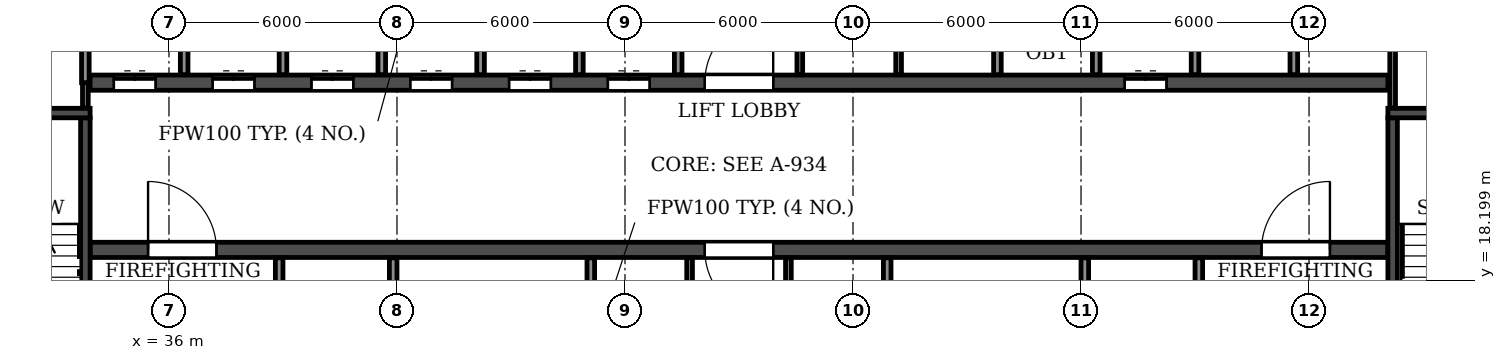
"""IFC4 building model, lengths in metres.
Left out: names, types, materials, properties, quantities, classifications, styles, units other than length and angle.
Written with IfcOpenShell. Run it as: python <this file> out.ifc"""

import sys

from ifc_helpers import new_model, si_unit, direction, frame, frame_2d, origin, place, context, subcontext, project, spatial, rectangle, extrude, element, fill, save


model = new_model("IFC4")
c1 = context("Model", 3, precision=1e-05, world=origin(), true_north=direction((0.0, 1.0)))
c2 = subcontext(c1, "Body", "Model", "MODEL_VIEW")
j1 = project(units=[si_unit("LENGTHUNIT", "METRE"), si_unit("PLANEANGLEUNIT", "RADIAN")], contexts=[c1])
p1 = place(None, origin())
s1 = spatial("IfcSite", under=j1, at=p1, CompositionType="ELEMENT")
p2 = place(p1, origin())
s2 = spatial("IfcBuilding", under=s1, at=p2, CompositionType="ELEMENT")
p3 = place(p2, frame((0.0, 0.0, 191.7)))
s3 = spatial("IfcBuildingStorey", under=s2, at=p3, CompositionType="ELEMENT", Elevation=191.7)
p4 = place(p3, frame((33.925, 19.0, 0.0), z_axis=(0.0, 0.0, 1.0), x_axis=(1.0, 0.0, 0.0)))
e1 = element("IfcWall", 1, at=p4, inside=s3, PredefinedType="SOLIDWALL", context=c2, shape_type="SweptSolid", body=[
    extrude(rectangle(XDim=34.15, YDim=0.4, at=frame_2d((17.075, 0.0))), origin(), (0.0, 0.0, 1.0), 3.08),
])
p5 = place(p4, frame((16.175, 0.0, 0.0)))
e2 = element("IfcOpeningElement", 2, at=p5, cuts=e1, PredefinedType="OPENING", context=c2, shape_type="SweptSolid", body=[
    extrude(rectangle(XDim=1.8, YDim=2.1, at=frame_2d((0.9, 1.05))), frame((0.0, 0.21, 0.0), z_axis=(0.0, -1.0, 0.0), x_axis=(1.0, 0.0, 0.0)), (0.0, 0.0, 1.0), 0.42),
])
p6 = place(p4, frame((1.525, 0.0, 0.0)))
e3 = element("IfcOpeningElement", 3, at=p6, cuts=e1, PredefinedType="OPENING", context=c2, shape_type="SweptSolid", body=[
    extrude(rectangle(XDim=1.8, YDim=2.1, at=frame_2d((0.9, 1.05))), frame((0.0, 0.21, 0.0), z_axis=(0.0, -1.0, 0.0), x_axis=(1.0, 0.0, 0.0)), (0.0, 0.0, 1.0), 0.42),
])
p7 = place(p4, frame((30.825, 0.0, 0.0)))
e4 = element("IfcOpeningElement", 4, at=p7, cuts=e1, PredefinedType="OPENING", context=c2, shape_type="SweptSolid", body=[
    extrude(rectangle(XDim=1.8, YDim=2.1, at=frame_2d((0.9, 1.05))), frame((0.0, 0.21, 0.0), z_axis=(0.0, -1.0, 0.0), x_axis=(1.0, 0.0, 0.0)), (0.0, 0.0, 1.0), 0.42),
])
p8 = place(p3, frame((33.925, 23.4, 0.0), z_axis=(0.0, 0.0, 1.0), x_axis=(1.0, 0.0, 0.0)))
e5 = element("IfcWall", 5, at=p8, inside=s3, PredefinedType="SOLIDWALL", context=c2, shape_type="SweptSolid", body=[
    extrude(rectangle(XDim=34.15, YDim=0.4, at=frame_2d((17.075, 0.0))), origin(), (0.0, 0.0, 1.0), 3.08),
])
p9 = place(p8, frame((16.175, 0.0, 0.0)))
e6 = element("IfcOpeningElement", 6, at=p9, cuts=e5, PredefinedType="OPENING", context=c2, shape_type="SweptSolid", body=[
    extrude(rectangle(XDim=1.8, YDim=2.1, at=frame_2d((0.9, 1.05))), frame((0.0, 0.21, 0.0), z_axis=(0.0, -1.0, 0.0), x_axis=(1.0, 0.0, 0.0)), (0.0, 0.0, 1.0), 0.42),
])
p10 = place(p8, frame((0.625, 0.0, 0.0)))
e7 = element("IfcOpeningElement", 7, at=p10, cuts=e5, PredefinedType="OPENING", context=c2, shape_type="SweptSolid", body=[
    extrude(rectangle(XDim=1.1, YDim=2.1, at=frame_2d((0.55, 1.05))), frame((0.0, 0.21, 0.0), z_axis=(0.0, -1.0, 0.0), x_axis=(1.0, 0.0, 0.0)), (0.0, 0.0, 1.0), 0.42),
])
p11 = place(p8, frame((3.225, 0.0, 0.0)))
e8 = element("IfcOpeningElement", 8, at=p11, cuts=e5, PredefinedType="OPENING", context=c2, shape_type="SweptSolid", body=[
    extrude(rectangle(XDim=1.1, YDim=2.1, at=frame_2d((0.55, 1.05))), frame((0.0, 0.21, 0.0), z_axis=(0.0, -1.0, 0.0), x_axis=(1.0, 0.0, 0.0)), (0.0, 0.0, 1.0), 0.42),
])
p12 = place(p8, frame((5.825, 0.0, 0.0)))
e9 = element("IfcOpeningElement", 9, at=p12, cuts=e5, PredefinedType="OPENING", context=c2, shape_type="SweptSolid", body=[
    extrude(rectangle(XDim=1.1, YDim=2.1, at=frame_2d((0.55, 1.05))), frame((0.0, 0.21, 0.0), z_axis=(0.0, -1.0, 0.0), x_axis=(1.0, 0.0, 0.0)), (0.0, 0.0, 1.0), 0.42),
])
p13 = place(p8, frame((8.425, 0.0, 0.0)))
e10 = element("IfcOpeningElement", 10, at=p13, cuts=e5, PredefinedType="OPENING", context=c2, shape_type="SweptSolid", body=[
    extrude(rectangle(XDim=1.1, YDim=2.1, at=frame_2d((0.55, 1.05))), frame((0.0, 0.21, 0.0), z_axis=(0.0, -1.0, 0.0), x_axis=(1.0, 0.0, 0.0)), (0.0, 0.0, 1.0), 0.42),
])
p14 = place(p8, frame((11.025, 0.0, 0.0)))
e11 = element("IfcOpeningElement", 11, at=p14, cuts=e5, PredefinedType="OPENING", context=c2, shape_type="SweptSolid", body=[
    extrude(rectangle(XDim=1.1, YDim=2.1, at=frame_2d((0.55, 1.05))), frame((0.0, 0.21, 0.0), z_axis=(0.0, -1.0, 0.0), x_axis=(1.0, 0.0, 0.0)), (0.0, 0.0, 1.0), 0.42),
])
p15 = place(p8, frame((13.625, 0.0, 0.0)))
e12 = element("IfcOpeningElement", 12, at=p15, cuts=e5, PredefinedType="OPENING", context=c2, shape_type="SweptSolid", body=[
    extrude(rectangle(XDim=1.1, YDim=2.1, at=frame_2d((0.55, 1.05))), frame((0.0, 0.21, 0.0), z_axis=(0.0, -1.0, 0.0), x_axis=(1.0, 0.0, 0.0)), (0.0, 0.0, 1.0), 0.42),
])
p16 = place(p8, frame((27.225, 0.0, 0.0)))
e13 = element("IfcOpeningElement", 13, at=p16, cuts=e5, PredefinedType="OPENING", context=c2, shape_type="SweptSolid", body=[
    extrude(rectangle(XDim=1.1, YDim=2.1, at=frame_2d((0.55, 1.05))), frame((0.0, 0.21, 0.0), z_axis=(0.0, -1.0, 0.0), x_axis=(1.0, 0.0, 0.0)), (0.0, 0.0, 1.0), 0.42),
])
p17 = place(p3, frame((33.8, 14.8, 0.0), z_axis=(0.0, 0.0, 1.0), x_axis=(0.0, 1.0, 0.0)))
e14 = element("IfcWall", 14, at=p17, inside=s3, PredefinedType="SOLIDWALL", context=c2, shape_type="SweptSolid", body=[
    extrude(rectangle(XDim=7.675, YDim=0.25, at=frame_2d((3.837, 0.0))), origin(), (0.0, 0.0, 1.0), 3.08),
])
p18 = place(p17, frame((0.5, 0.0, 0.0)))
e15 = element("IfcOpeningElement", 15, at=p18, cuts=e14, PredefinedType="OPENING", context=c2, shape_type="SweptSolid", body=[
    extrude(rectangle(XDim=1.0, YDim=2.1, at=frame_2d((0.5, 1.05))), frame((0.0, 0.135, 0.0), z_axis=(0.0, -1.0, 0.0), x_axis=(1.0, 0.0, 0.0)), (0.0, 0.0, 1.0), 0.27),
])
p19 = place(p3, frame((29.875, 22.6, 0.0), z_axis=(0.0, 0.0, 1.0), x_axis=(1.0, 0.0, 0.0)))
e16 = element("IfcWall", 16, at=p19, inside=s3, PredefinedType="SOLIDWALL", context=c2, shape_type="SweptSolid", body=[
    extrude(rectangle(XDim=4.05, YDim=0.25, at=frame_2d((2.025, 0.0))), origin(), (0.0, 0.0, 1.0), 3.08),
])
p20 = place(p3, frame((68.2, 14.8, 0.0), z_axis=(0.0, 0.0, 1.0), x_axis=(0.0, 1.0, 0.0)))
e17 = element("IfcWall", 17, at=p20, inside=s3, PredefinedType="SOLIDWALL", context=c2, shape_type="SweptSolid", body=[
    extrude(rectangle(XDim=7.675, YDim=0.25, at=frame_2d((3.837, 0.0))), origin(), (0.0, 0.0, 1.0), 3.08),
])
p21 = place(p20, frame((0.5, 0.0, 0.0)))
e18 = element("IfcOpeningElement", 18, at=p21, cuts=e17, PredefinedType="OPENING", context=c2, shape_type="SweptSolid", body=[
    extrude(rectangle(XDim=1.0, YDim=2.1, at=frame_2d((0.5, 1.05))), frame((0.0, 0.135, 0.0), z_axis=(0.0, -1.0, 0.0), x_axis=(1.0, 0.0, 0.0)), (0.0, 0.0, 1.0), 0.27),
])
p22 = place(p3, frame((68.075, 22.6, 0.0), z_axis=(0.0, 0.0, 1.0), x_axis=(1.0, 0.0, 0.0)))
e19 = element("IfcWall", 19, at=p22, inside=s3, PredefinedType="SOLIDWALL", context=c2, shape_type="SweptSolid", body=[
    extrude(rectangle(XDim=4.05, YDim=0.25, at=frame_2d((2.025, 0.0))), origin(), (0.0, 0.0, 1.0), 3.08),
])
for number, where, z_axis, x_axis in (
    (20, (49.7, 14.81, 0.0), (0.0, 0.0, 1.0), (0.0, 1.0, 0.0)),
    (21, (52.3, 14.81, 0.0), (0.0, 0.0, 1.0), (0.0, 1.0, 0.0)),
    (22, (52.6, 23.61, 0.0), (0.0, 0.0, 1.0), (0.0, 1.0, 0.0)),
    (23, (55.2, 23.61, 0.0), (0.0, 0.0, 1.0), (0.0, 1.0, 0.0)),
):
    element("IfcWall", number, at=place(p3, frame(where, z_axis=z_axis, x_axis=x_axis)), inside=s3, PredefinedType="PARTITIONING", context=c2, shape_type="SweptSolid", body=[
        extrude(rectangle(XDim=3.98, YDim=0.15, at=frame_2d((1.99, 0.0))), origin(), (0.0, 0.0, 1.0), 3.08),
    ])
for number, where, z_axis, x_axis in (
    (24, (47.1, 14.81, 0.0), (0.0, 0.0, 1.0), (0.0, 1.0, 0.0)),
    (25, (54.9, 14.81, 0.0), (0.0, 0.0, 1.0), (0.0, 1.0, 0.0)),
    (26, (65.6, 23.61, 0.0), (0.0, 0.0, 1.0), (0.0, 1.0, 0.0)),
):
    element("IfcWall", number, at=place(p3, frame(where, z_axis=z_axis, x_axis=x_axis)), inside=s3, PredefinedType="PARTITIONING", context=c2, shape_type="SweptSolid", body=[
        extrude(rectangle(XDim=3.98, YDim=0.2, at=frame_2d((1.99, 0.0))), origin(), (0.0, 0.0, 1.0), 3.08),
    ])
p23 = place(p3, frame((33.8, 22.735, 0.0), z_axis=(0.0, 0.0, 1.0), x_axis=(0.0, 1.0, 0.0)))
e27 = element("IfcWall", 27, at=p23, inside=s3, PredefinedType="PARTITIONING", context=c2, shape_type="SweptSolid", body=[
    extrude(rectangle(XDim=0.665, YDim=0.15, at=frame_2d((0.333, 0.0))), origin(), (0.0, 0.0, 1.0), 3.08),
])
p24 = place(p3, frame((68.2, 22.735, 0.0), z_axis=(0.0, 0.0, 1.0), x_axis=(0.0, 1.0, 0.0)))
e28 = element("IfcWall", 28, at=p24, inside=s3, PredefinedType="PARTITIONING", context=c2, shape_type="SweptSolid", body=[
    extrude(rectangle(XDim=4.855, YDim=0.15, at=frame_2d((2.427, 0.0))), origin(), (0.0, 0.0, 1.0), 3.08),
])
p25 = place(p3, frame((33.8, 23.4, 0.0), z_axis=(0.0, 0.0, 1.0), x_axis=(0.0, 1.0, 0.0)))
e29 = element("IfcWall", 29, at=p25, inside=s3, PredefinedType="PARTITIONING", context=c2, shape_type="SweptSolid", body=[
    extrude(rectangle(XDim=2.7, YDim=0.2, at=frame_2d((1.35, 0.0))), origin(), (0.0, 0.0, 1.0), 3.08),
])
p26 = place(p3, frame((36.4, 23.61, 0.0), z_axis=(0.0, 0.0, 1.0), x_axis=(0.0, 1.0, 0.0)))
e30 = element("IfcWall", 30, at=p26, inside=s3, PredefinedType="PARTITIONING", context=c2, shape_type="SweptSolid", body=[
    extrude(rectangle(XDim=2.49, YDim=0.2, at=frame_2d((1.245, 0.0))), origin(), (0.0, 0.0, 1.0), 3.08),
])
p27 = place(p3, frame((38.9, 14.81, 0.0), z_axis=(0.0, 0.0, 1.0), x_axis=(0.0, 1.0, 0.0)))
e31 = element("IfcWall", 31, at=p27, inside=s3, PredefinedType="PARTITIONING", context=c2, shape_type="SweptSolid", body=[
    extrude(rectangle(XDim=3.98, YDim=0.2, at=frame_2d((1.99, 0.0))), origin(), (0.0, 0.0, 1.0), 3.08),
])
p28 = place(p27, frame((1.44, 0.0, 0.0)))
e32 = element("IfcOpeningElement", 32, at=p28, cuts=e31, PredefinedType="OPENING", context=c2, shape_type="SweptSolid", body=[
    extrude(rectangle(XDim=1.1, YDim=2.1, at=frame_2d((0.55, 1.05))), frame((0.0, 0.11, 0.0), z_axis=(0.0, -1.0, 0.0), x_axis=(1.0, 0.0, 0.0)), (0.0, 0.0, 1.0), 0.22),
])
for number, where, z_axis, x_axis in (
    (33, (39.0, 23.61, 0.0), (0.0, 0.0, 1.0), (0.0, 1.0, 0.0)),
    (34, (41.6, 23.61, 0.0), (0.0, 0.0, 1.0), (0.0, 1.0, 0.0)),
):
    element("IfcWall", number, at=place(p3, frame(where, z_axis=z_axis, x_axis=x_axis)), inside=s3, PredefinedType="PARTITIONING", context=c2, shape_type="SweptSolid", body=[
        extrude(rectangle(XDim=2.49, YDim=0.2, at=frame_2d((1.245, 0.0))), origin(), (0.0, 0.0, 1.0), 3.08),
    ])
for number, where, z_axis, x_axis in (
    (35, (41.9, 14.81, 0.0), (0.0, 0.0, 1.0), (0.0, 1.0, 0.0)),
    (36, (44.2, 23.61, 0.0), (0.0, 0.0, 1.0), (0.0, 1.0, 0.0)),
    (37, (46.8, 23.61, 0.0), (0.0, 0.0, 1.0), (0.0, 1.0, 0.0)),
):
    element("IfcWall", number, at=place(p3, frame(where, z_axis=z_axis, x_axis=x_axis)), inside=s3, PredefinedType="PARTITIONING", context=c2, shape_type="SweptSolid", body=[
        extrude(rectangle(XDim=3.98, YDim=0.2, at=frame_2d((1.99, 0.0))), origin(), (0.0, 0.0, 1.0), 3.08),
    ])
for number, where, z_axis, x_axis in (
    (38, (49.4, 23.61, 0.0), (0.0, 0.0, 1.0), (0.0, 1.0, 0.0)),
    (39, (57.8, 23.61, 0.0), (0.0, 0.0, 1.0), (0.0, 1.0, 0.0)),
):
    element("IfcWall", number, at=place(p3, frame(where, z_axis=z_axis, x_axis=x_axis)), inside=s3, PredefinedType="PARTITIONING", context=c2, shape_type="SweptSolid", body=[
        extrude(rectangle(XDim=2.49, YDim=0.2, at=frame_2d((1.245, 0.0))), origin(), (0.0, 0.0, 1.0), 3.08),
    ])
p29 = place(p3, frame((60.1, 14.81, 0.0), z_axis=(0.0, 0.0, 1.0), x_axis=(0.0, 1.0, 0.0)))
e40 = element("IfcWall", 40, at=p29, inside=s3, PredefinedType="PARTITIONING", context=c2, shape_type="SweptSolid", body=[
    extrude(rectangle(XDim=3.98, YDim=0.2, at=frame_2d((1.99, 0.0))), origin(), (0.0, 0.0, 1.0), 3.08),
])
for number, where, z_axis, x_axis in (
    (41, (60.4, 23.61, 0.0), (0.0, 0.0, 1.0), (0.0, 1.0, 0.0)),
    (42, (63.0, 23.61, 0.0), (0.0, 0.0, 1.0), (0.0, 1.0, 0.0)),
):
    element("IfcWall", number, at=place(p3, frame(where, z_axis=z_axis, x_axis=x_axis)), inside=s3, PredefinedType="PARTITIONING", context=c2, shape_type="SweptSolid", body=[
        extrude(rectangle(XDim=2.49, YDim=0.2, at=frame_2d((1.245, 0.0))), origin(), (0.0, 0.0, 1.0), 3.08),
    ])
p30 = place(p3, frame((63.1, 14.81, 0.0), z_axis=(0.0, 0.0, 1.0), x_axis=(0.0, 1.0, 0.0)))
e43 = element("IfcWall", 43, at=p30, inside=s3, PredefinedType="PARTITIONING", context=c2, shape_type="SweptSolid", body=[
    extrude(rectangle(XDim=3.98, YDim=0.2, at=frame_2d((1.99, 0.0))), origin(), (0.0, 0.0, 1.0), 3.08),
])
p31 = place(p30, frame((1.44, 0.0, 0.0)))
e44 = element("IfcOpeningElement", 44, at=p31, cuts=e43, PredefinedType="OPENING", context=c2, shape_type="SweptSolid", body=[
    extrude(rectangle(XDim=1.1, YDim=2.1, at=frame_2d((0.55, 1.05))), frame((0.0, 0.11, 0.0), z_axis=(0.0, -1.0, 0.0), x_axis=(1.0, 0.0, 0.0)), (0.0, 0.0, 1.0), 0.22),
])
p32 = place(p9, origin())
e45 = element("IfcDoor", 45, at=p32, inside=s3, OperationType="DOUBLE_DOOR_SINGLE_SWING", PredefinedType="DOOR", context=c2, shape_type="SweptSolid", body=[
    extrude(rectangle(XDim=1.8, YDim=2.1, at=frame_2d((0.9, 1.05))), frame((0.0, 0.025, 0.0), z_axis=(0.0, -1.0, 0.0), x_axis=(1.0, 0.0, 0.0)), (0.0, 0.0, 1.0), 0.05),
])
fill(e6, e45)
p33 = place(p5, frame((1.8, 0.0, 0.0), z_axis=(0.0, 0.0, 1.0), x_axis=(-1.0, 0.0, 0.0)))
e46 = element("IfcDoor", 46, at=p33, inside=s3, OperationType="DOUBLE_DOOR_SINGLE_SWING", PredefinedType="DOOR", context=c2, shape_type="SweptSolid", body=[
    extrude(rectangle(XDim=1.8, YDim=2.1, at=frame_2d((0.9, 1.05))), frame((0.0, 0.025, 0.0), z_axis=(0.0, -1.0, 0.0), x_axis=(1.0, 0.0, 0.0)), (0.0, 0.0, 1.0), 0.05),
])
fill(e2, e46)
p34 = place(p10, origin())
e47 = element("IfcDoor", 47, at=p34, inside=s3, OperationType="DOUBLE_DOOR_SLIDING", PredefinedType="DOOR", context=c2, shape_type="SweptSolid", body=[
    extrude(rectangle(XDim=1.1, YDim=2.1, at=frame_2d((0.55, 1.05))), frame((0.0, 0.025, 0.0), z_axis=(0.0, -1.0, 0.0), x_axis=(1.0, 0.0, 0.0)), (0.0, 0.0, 1.0), 0.05),
])
fill(e7, e47)
p35 = place(p6, origin())
e48 = element("IfcDoor", 48, at=p35, inside=s3, OperationType="DOUBLE_DOOR_SINGLE_SWING", PredefinedType="DOOR", context=c2, shape_type="SweptSolid", body=[
    extrude(rectangle(XDim=1.8, YDim=2.1, at=frame_2d((0.9, 1.05))), frame((0.0, 0.025, 0.0), z_axis=(0.0, -1.0, 0.0), x_axis=(1.0, 0.0, 0.0)), (0.0, 0.0, 1.0), 0.05),
])
fill(e3, e48)
p36 = place(p11, origin())
e49 = element("IfcDoor", 49, at=p36, inside=s3, OperationType="DOUBLE_DOOR_SLIDING", PredefinedType="DOOR", context=c2, shape_type="SweptSolid", body=[
    extrude(rectangle(XDim=1.1, YDim=2.1, at=frame_2d((0.55, 1.05))), frame((0.0, 0.025, 0.0), z_axis=(0.0, -1.0, 0.0), x_axis=(1.0, 0.0, 0.0)), (0.0, 0.0, 1.0), 0.05),
])
fill(e8, e49)
p37 = place(p12, origin())
e50 = element("IfcDoor", 50, at=p37, inside=s3, OperationType="DOUBLE_DOOR_SLIDING", PredefinedType="DOOR", context=c2, shape_type="SweptSolid", body=[
    extrude(rectangle(XDim=1.1, YDim=2.1, at=frame_2d((0.55, 1.05))), frame((0.0, 0.025, 0.0), z_axis=(0.0, -1.0, 0.0), x_axis=(1.0, 0.0, 0.0)), (0.0, 0.0, 1.0), 0.05),
])
fill(e9, e50)
p38 = place(p13, origin())
e51 = element("IfcDoor", 51, at=p38, inside=s3, OperationType="DOUBLE_DOOR_SLIDING", PredefinedType="DOOR", context=c2, shape_type="SweptSolid", body=[
    extrude(rectangle(XDim=1.1, YDim=2.1, at=frame_2d((0.55, 1.05))), frame((0.0, 0.025, 0.0), z_axis=(0.0, -1.0, 0.0), x_axis=(1.0, 0.0, 0.0)), (0.0, 0.0, 1.0), 0.05),
])
fill(e10, e51)
p39 = place(p14, origin())
e52 = element("IfcDoor", 52, at=p39, inside=s3, OperationType="DOUBLE_DOOR_SLIDING", PredefinedType="DOOR", context=c2, shape_type="SweptSolid", body=[
    extrude(rectangle(XDim=1.1, YDim=2.1, at=frame_2d((0.55, 1.05))), frame((0.0, 0.025, 0.0), z_axis=(0.0, -1.0, 0.0), x_axis=(1.0, 0.0, 0.0)), (0.0, 0.0, 1.0), 0.05),
])
fill(e11, e52)
p40 = place(p15, origin())
e53 = element("IfcDoor", 53, at=p40, inside=s3, OperationType="DOUBLE_DOOR_SLIDING", PredefinedType="DOOR", context=c2, shape_type="SweptSolid", body=[
    extrude(rectangle(XDim=1.1, YDim=2.1, at=frame_2d((0.55, 1.05))), frame((0.0, 0.025, 0.0), z_axis=(0.0, -1.0, 0.0), x_axis=(1.0, 0.0, 0.0)), (0.0, 0.0, 1.0), 0.05),
])
fill(e12, e53)
p41 = place(p16, origin())
e54 = element("IfcDoor", 54, at=p41, inside=s3, OperationType="DOUBLE_DOOR_SLIDING", PredefinedType="DOOR", context=c2, shape_type="SweptSolid", body=[
    extrude(rectangle(XDim=1.1, YDim=2.1, at=frame_2d((0.55, 1.05))), frame((0.0, 0.025, 0.0), z_axis=(0.0, -1.0, 0.0), x_axis=(1.0, 0.0, 0.0)), (0.0, 0.0, 1.0), 0.05),
])
fill(e13, e54)
p42 = place(p7, origin())
e55 = element("IfcDoor", 55, at=p42, inside=s3, OperationType="DOUBLE_DOOR_SINGLE_SWING", PredefinedType="DOOR", context=c2, shape_type="SweptSolid", body=[
    extrude(rectangle(XDim=1.8, YDim=2.1, at=frame_2d((0.9, 1.05))), frame((0.0, 0.025, 0.0), z_axis=(0.0, -1.0, 0.0), x_axis=(1.0, 0.0, 0.0)), (0.0, 0.0, 1.0), 0.05),
])
fill(e4, e55)
save(model, sys.argv[1])
